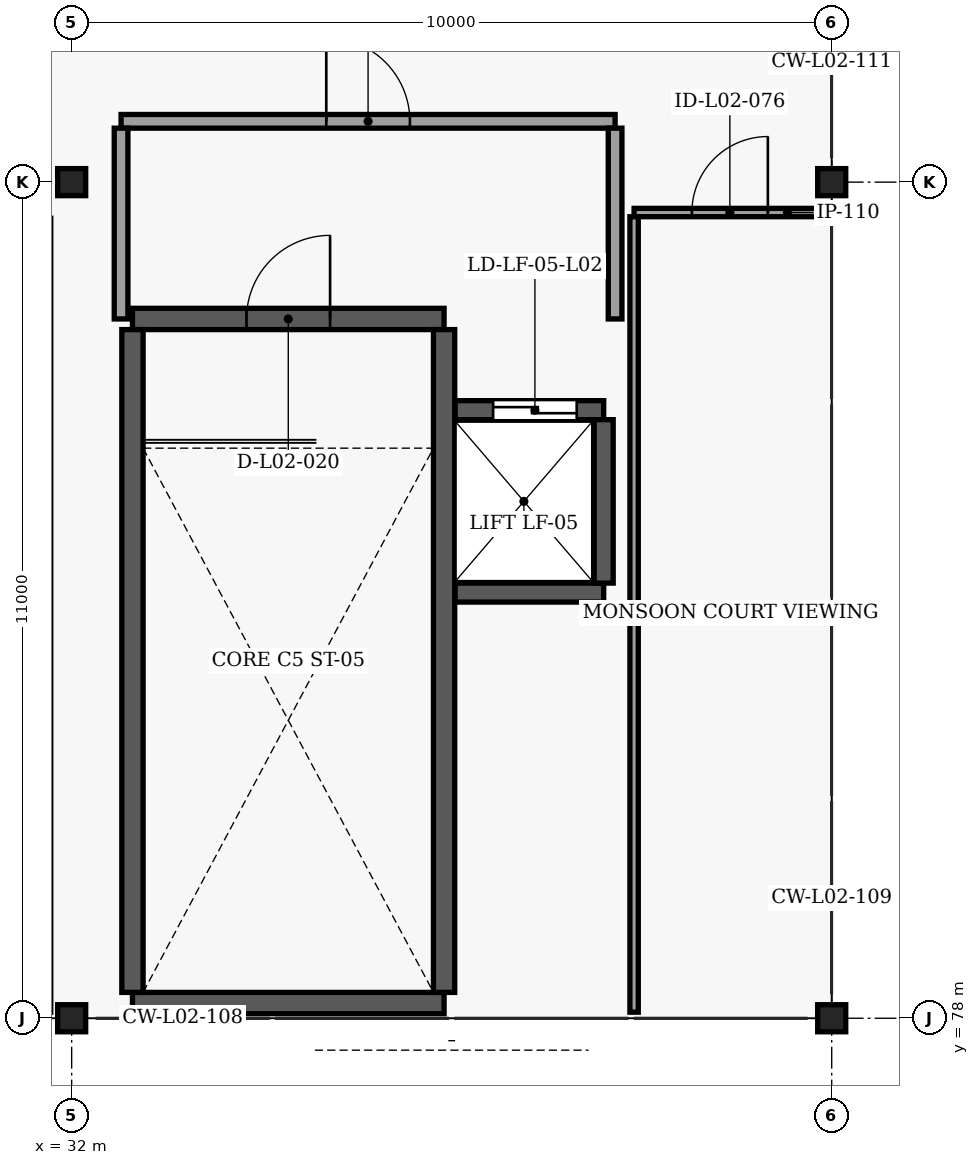
"""IFC4 building model, lengths in metres.
Left out: names, types, materials, properties, quantities, classifications, styles, units other than length and angle.
Written with IfcOpenShell. Run it as: python <this file> out.ifc"""

import sys

from ifc_helpers import new_model, si_unit, direction, frame, frame_2d, origin, origin_2d, place, context, subcontext, project, spatial, rectangle, i_section, extrude, element, fill, save


model = new_model("IFC4")
c1 = context("Model", 3, precision=1e-05, world=origin(), true_north=direction((0.0, 1.0)))
c2 = subcontext(c1, "Body", "Model", "MODEL_VIEW")
j1 = project(units=[si_unit("LENGTHUNIT", "METRE"), si_unit("PLANEANGLEUNIT", "RADIAN")], contexts=[c1])
p1 = place(None, origin())
s1 = spatial("IfcSite", under=j1, at=p1, CompositionType="ELEMENT")
p2 = place(p1, origin())
s2 = spatial("IfcBuilding", under=s1, at=p2, CompositionType="ELEMENT")
p3 = place(p2, frame((0.0, 0.0, 5.4)))
s3 = spatial("IfcBuildingStorey", under=s2, at=p3, CompositionType="ELEMENT", Elevation=5.4)
for number, where, z_axis, x_axis in (
    (1, (32.0, 78.0, 0.0), (0.0, 0.0, 1.0), (1.0, 0.0, 0.0)),
    (2, (42.0, 78.0, 0.0), (0.0, 0.0, 1.0), (1.0, 0.0, 0.0)),
    (3, (32.0, 89.0, 0.0), (0.0, 0.0, 1.0), (1.0, 0.0, 0.0)),
    (4, (42.0, 89.0, 0.0), (0.0, 0.0, 1.0), (1.0, 0.0, 0.0)),
):
    element("IfcColumn", number, at=place(p3, frame(where, z_axis=z_axis, x_axis=x_axis)), inside=s3, PredefinedType="COLUMN", context=c2, shape_type="SweptSolid", body=[
        extrude(i_section(OverallWidth=0.369, OverallDepth=0.356, WebThickness=0.011, FlangeThickness=0.018, FilletRadius=0.015, at=origin_2d()), origin(), (0.0, 0.0, 1.0), 4.56),
    ])
p4 = place(p3, frame((32.8, 78.2, 0.0), z_axis=(0.0, 0.0, 1.0), x_axis=(1.0, 0.0, 0.0)))
e5 = element("IfcWall", 5, at=p4, inside=s3, PredefinedType="SHEAR", context=c2, shape_type="SweptSolid", body=[
    extrude(rectangle(XDim=4.1, YDim=0.28, at=frame_2d((2.05, 0.0))), origin(), (0.0, 0.0, 1.0), 5.7),
])
p5 = place(p3, frame((32.8, 87.2, 0.0), z_axis=(0.0, 0.0, 1.0), x_axis=(1.0, 0.0, 0.0)))
e6 = element("IfcWall", 6, at=p5, inside=s3, PredefinedType="SHEAR", context=c2, shape_type="SweptSolid", body=[
    extrude(rectangle(XDim=4.1, YDim=0.28, at=frame_2d((2.05, 0.0))), origin(), (0.0, 0.0, 1.0), 5.7),
])
p6 = place(p5, frame((1.5, 0.0, 0.0)))
e7 = element("IfcOpeningElement", 7, at=p6, cuts=e6, PredefinedType="OPENING", context=c2, shape_type="SweptSolid", body=[
    extrude(rectangle(XDim=1.1, YDim=2.2, at=frame_2d((0.55, 1.1))), frame((0.0, 0.15, 0.0), z_axis=(0.0, -1.0, 0.0), x_axis=(1.0, 0.0, 0.0)), (0.0, 0.0, 1.0), 0.3),
])
for number, where, z_axis, x_axis in (
    (8, (32.8, 78.34, 0.0), (0.0, 0.0, 1.0), (0.0, 1.0, 0.0)),
    (9, (36.9, 78.34, 0.0), (0.0, 0.0, 1.0), (0.0, 1.0, 0.0)),
):
    element("IfcWall", number, at=place(p3, frame(where, z_axis=z_axis, x_axis=x_axis)), inside=s3, PredefinedType="SHEAR", context=c2, shape_type="SweptSolid", body=[
        extrude(rectangle(XDim=8.72, YDim=0.28, at=frame_2d((4.36, 0.0))), origin(), (0.0, 0.0, 1.0), 5.7),
    ])
p7 = place(p3, frame((37.045, 83.6, 0.0), z_axis=(0.0, 0.0, 1.0), x_axis=(1.0, 0.0, 0.0)))
e10 = element("IfcWall", 10, at=p7, inside=s3, PredefinedType="SOLIDWALL", context=c2, shape_type="SweptSolid", body=[
    extrude(rectangle(XDim=1.955, YDim=0.25, at=frame_2d((0.978, 0.0))), origin(), (0.0, 0.0, 1.0), 6.48),
])
p8 = place(p3, frame((37.045, 86.0, 0.0), z_axis=(0.0, 0.0, 1.0), x_axis=(1.0, 0.0, 0.0)))
e11 = element("IfcWall", 11, at=p8, inside=s3, PredefinedType="SOLIDWALL", context=c2, shape_type="SweptSolid", body=[
    extrude(rectangle(XDim=1.955, YDim=0.25, at=frame_2d((0.978, 0.0))), origin(), (0.0, 0.0, 1.0), 6.48),
])
p9 = place(p8, frame((0.5, 0.0, 0.0)))
e12 = element("IfcOpeningElement", 12, at=p9, cuts=e11, PredefinedType="OPENING", context=c2, shape_type="SweptSolid", body=[
    extrude(rectangle(XDim=1.1, YDim=2.2, at=frame_2d((0.55, 1.1))), frame((0.0, 0.135, 0.0), z_axis=(0.0, -1.0, 0.0), x_axis=(1.0, 0.0, 0.0)), (0.0, 0.0, 1.0), 0.27),
])
p10 = place(p3, frame((39.0, 83.725, 0.0), z_axis=(0.0, 0.0, 1.0), x_axis=(0.0, 1.0, 0.0)))
e13 = element("IfcWall", 13, at=p10, inside=s3, PredefinedType="SOLIDWALL", context=c2, shape_type="SweptSolid", body=[
    extrude(rectangle(XDim=2.15, YDim=0.25, at=frame_2d((1.075, 0.0))), origin(), (0.0, 0.0, 1.0), 6.48),
])
p11 = place(p3, frame((32.65, 89.8, 0.0), z_axis=(0.0, 0.0, 1.0), x_axis=(1.0, 0.0, 0.0)))
e14 = element("IfcWall", 14, at=p11, inside=s3, PredefinedType="SOLIDWALL", context=c2, shape_type="SweptSolid", body=[
    extrude(rectangle(XDim=6.5, YDim=0.18, at=frame_2d((3.25, 0.0))), origin(), (0.0, 0.0, 1.0), 4.5),
])
p12 = place(p11, frame((2.7, 0.0, 0.0)))
e15 = element("IfcOpeningElement", 15, at=p12, cuts=e14, PredefinedType="OPENING", context=c2, shape_type="SweptSolid", body=[
    extrude(rectangle(XDim=1.1, YDim=2.2, at=frame_2d((0.55, 1.1))), frame((0.0, 0.1, 0.0), z_axis=(0.0, -1.0, 0.0), x_axis=(1.0, 0.0, 0.0)), (0.0, 0.0, 1.0), 0.2),
])
for number, where, z_axis, x_axis in (
    (16, (32.65, 87.2, 0.0), (0.0, 0.0, 1.0), (0.0, 1.0, 0.0)),
    (17, (39.15, 87.2, 0.0), (0.0, 0.0, 1.0), (0.0, 1.0, 0.0)),
):
    element("IfcWall", number, at=place(p3, frame(where, z_axis=z_axis, x_axis=x_axis)), inside=s3, PredefinedType="SOLIDWALL", context=c2, shape_type="SweptSolid", body=[
        extrude(rectangle(XDim=2.51, YDim=0.18, at=frame_2d((1.255, 0.0))), origin(), (0.0, 0.0, 1.0), 4.1),
    ])
p13 = place(p3, frame((39.4, 88.6, 0.0), z_axis=(0.0, 0.0, 1.0), x_axis=(1.0, 0.0, 0.0)))
e18 = element("IfcWall", 18, at=p13, inside=s3, PredefinedType="MOVABLE", context=c2, shape_type="SweptSolid", body=[
    extrude(rectangle(XDim=2.52, YDim=0.11, at=frame_2d((1.26, 0.0))), origin(), (0.0, 0.0, 1.0), 4.5),
])
p14 = place(p13, frame((0.76, 0.0, 0.0)))
e19 = element("IfcOpeningElement", 19, at=p14, cuts=e18, PredefinedType="OPENING", context=c2, shape_type="SweptSolid", body=[
    extrude(rectangle(XDim=1.0, YDim=2.15, at=frame_2d((0.5, 1.075))), frame((0.0, 0.065, 0.0), z_axis=(0.0, -1.0, 0.0), x_axis=(1.0, 0.0, 0.0)), (0.0, 0.0, 1.0), 0.13),
])
p15 = place(p3, frame((39.4, 78.08, 0.0), z_axis=(0.0, 0.0, 1.0), x_axis=(0.0, 1.0, 0.0)))
e20 = element("IfcWall", 20, at=p15, inside=s3, PredefinedType="MOVABLE", context=c2, shape_type="SweptSolid", body=[
    extrude(rectangle(XDim=10.465, YDim=0.11, at=frame_2d((5.232, 0.0))), origin(), (0.0, 0.0, 1.0), 4.247),
])
p16 = place(p6, origin())
e21 = element("IfcDoor", 21, at=p16, inside=s3, OperationType="SINGLE_SWING_RIGHT", PredefinedType="DOOR", context=c2, shape_type="SweptSolid", body=[
    extrude(rectangle(XDim=1.1, YDim=2.2, at=frame_2d((0.55, 1.1))), frame((0.0, 0.025, 0.0), z_axis=(0.0, -1.0, 0.0), x_axis=(1.0, 0.0, 0.0)), (0.0, 0.0, 1.0), 0.05),
])
fill(e7, e21)
p17 = place(p9, origin())
e22 = element("IfcDoor", 22, at=p17, inside=s3, OperationType="SLIDING_TO_LEFT", PredefinedType="DOOR", context=c2, shape_type="SweptSolid", body=[
    extrude(rectangle(XDim=1.1, YDim=2.2, at=frame_2d((0.55, 1.1))), frame((0.0, 0.025, 0.0), z_axis=(0.0, -1.0, 0.0), x_axis=(1.0, 0.0, 0.0)), (0.0, 0.0, 1.0), 0.05),
])
fill(e12, e22)
p18 = place(p12, origin())
e23 = element("IfcDoor", 23, at=p18, inside=s3, OperationType="SINGLE_SWING_LEFT", PredefinedType="DOOR", context=c2, shape_type="SweptSolid", body=[
    extrude(rectangle(XDim=1.1, YDim=2.2, at=frame_2d((0.55, 1.1))), frame((0.0, 0.025, 0.0), z_axis=(0.0, -1.0, 0.0), x_axis=(1.0, 0.0, 0.0)), (0.0, 0.0, 1.0), 0.05),
])
fill(e15, e23)
p19 = place(p14, origin())
e24 = element("IfcDoor", 24, at=p19, inside=s3, OperationType="SINGLE_SWING_RIGHT", PredefinedType="DOOR", context=c2, shape_type="SweptSolid", body=[
    extrude(rectangle(XDim=1.0, YDim=2.15, at=frame_2d((0.5, 1.075))), frame((0.0, 0.025, 0.0), z_axis=(0.0, -1.0, 0.0), x_axis=(1.0, 0.0, 0.0)), (0.0, 0.0, 1.0), 0.05),
])
fill(e19, e24)
save(model, sys.argv[1])
